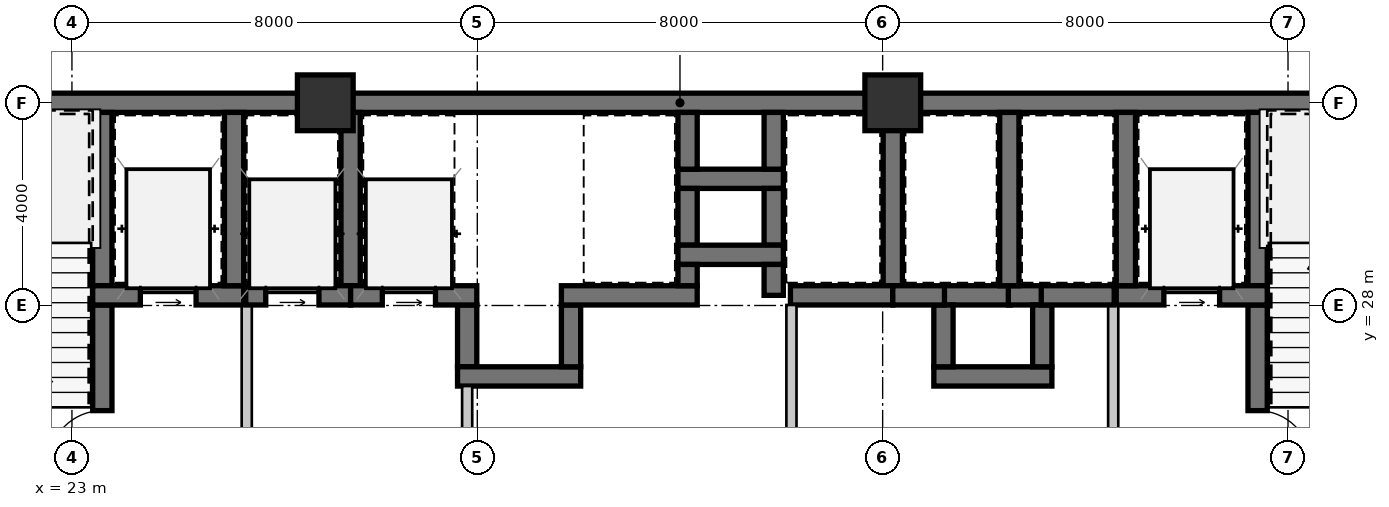
"""IFC4 building model, lengths in metres.
Left out: names, types, materials, properties, quantities, classifications, styles, units other than length and angle.
Written with IfcOpenShell. Run it as: python <this file> out.ifc"""

import sys

from ifc_helpers import new_model, si_unit, direction, frame, frame_2d, origin, origin_2d, place, context, subcontext, project, spatial, rectangle, extrude, source, transform, mapped, element, fill, save


model = new_model("IFC4")
c1 = context("Model", 3, precision=1e-05, world=origin(), true_north=direction((0.0, 1.0)))
c2 = subcontext(c1, "Body", "Model", "MODEL_VIEW")
j1 = project(units=[si_unit("LENGTHUNIT", "METRE"), si_unit("PLANEANGLEUNIT", "RADIAN")], contexts=[c1])
p1 = place(None, origin())
s1 = spatial("IfcSite", under=j1, at=p1, CompositionType="ELEMENT")
p2 = place(p1, origin())
s2 = spatial("IfcBuilding", under=s1, at=p2, CompositionType="ELEMENT")
p3 = place(p2, frame((0.0, 0.0, 4.55)))
s3 = spatial("IfcBuildingStorey", under=s2, at=p3, CompositionType="ELEMENT", Elevation=4.55)
m1 = source(origin(), c2, "Body", "SweptSolid", [
    extrude(rectangle(XDim=1.1, YDim=1.1, at=origin_2d()), origin(), (0.0, 0.0, 1.0), 3.85),
])
for number, where, z_axis, x_axis in (
    (1, (28.0, 32.0, 0.0), (0.0, 0.0, 1.0), (1.0, 0.0, 0.0)),
    (2, (39.2, 32.0, 0.0), (0.0, 0.0, 1.0), (1.0, 0.0, 0.0)),
):
    element("IfcColumn", number, at=place(p3, frame(where, z_axis=z_axis, x_axis=x_axis)), inside=s3, PredefinedType="COLUMN", context=c2, shape_type="MappedRepresentation", body=[
        mapped(m1, transform((0.0, 0.0, 0.0), scale=1.0)),
    ])
m2 = source(origin(), c2, "Body", "SweptSolid", [
    extrude(rectangle(XDim=9.19, YDim=0.38, at=frame_2d((4.595, 0.0))), origin(), (0.0, 0.0, 1.0), 3.59),
])
p4 = place(p3, frame((18.81, 32.0, 0.0), z_axis=(0.0, 0.0, 1.0), x_axis=(1.0, 0.0, 0.0)))
e3 = element("IfcWall", 3, at=p4, inside=s3, PredefinedType="SHEAR", context=c2, shape_type="MappedRepresentation", body=[
    mapped(m2, transform((0.0, 0.0, 0.0), scale=1.0)),
])
m3 = source(origin(), c2, "Body", "SweptSolid", [
    extrude(rectangle(XDim=11.2, YDim=0.38, at=frame_2d((5.6, 0.0))), origin(), (0.0, 0.0, 1.0), 3.59),
])
p5 = place(p3, frame((28.0, 32.0, 0.0), z_axis=(0.0, 0.0, 1.0), x_axis=(1.0, 0.0, 0.0)))
e4 = element("IfcWall", 4, at=p5, inside=s3, PredefinedType="SHEAR", context=c2, shape_type="MappedRepresentation", body=[
    mapped(m3, transform((0.0, 0.0, 0.0), scale=1.0)),
])
m4 = source(origin(), c2, "Body", "SweptSolid", [
    extrude(rectangle(XDim=11.99, YDim=0.38, at=frame_2d((5.995, 0.0))), origin(), (0.0, 0.0, 1.0), 3.59),
])
p6 = place(p3, frame((39.2, 32.0, 0.0), z_axis=(0.0, 0.0, 1.0), x_axis=(1.0, 0.0, 0.0)))
e5 = element("IfcWall", 5, at=p6, inside=s3, PredefinedType="SHEAR", context=c2, shape_type="MappedRepresentation", body=[
    mapped(m4, transform((0.0, 0.0, 0.0), scale=1.0)),
])
m5 = source(origin(), c2, "Body", "SweptSolid", [
    extrude(rectangle(XDim=3.42, YDim=0.38, at=frame_2d((1.71, 0.0))), origin(), (0.0, 0.0, 1.0), 3.59),
])
p7 = place(p3, frame((23.6, 28.39, 0.0), z_axis=(0.0, 0.0, 1.0), x_axis=(0.0, 1.0, 0.0)))
e6 = element("IfcWall", 6, at=p7, inside=s3, PredefinedType="SHEAR", context=c2, shape_type="MappedRepresentation", body=[
    mapped(m5, transform((0.0, 0.0, 0.0), scale=1.0)),
])
m6 = source(origin(), c2, "Body", "SweptSolid", [
    extrude(rectangle(XDim=3.82, YDim=0.38, at=frame_2d((1.91, 0.0))), origin(), (0.0, 0.0, 1.0), 3.59),
])
p8 = place(p3, frame((23.6, 24.19, 0.0), z_axis=(0.0, 0.0, 1.0), x_axis=(0.0, 1.0, 0.0)))
e7 = element("IfcWall", 7, at=p8, inside=s3, PredefinedType="SHEAR", context=c2, shape_type="MappedRepresentation", body=[
    mapped(m6, transform((0.0, 0.0, 0.0), scale=1.0)),
])
m7 = source(origin(), c2, "Body", "SweptSolid", [
    extrude(rectangle(XDim=1.05, YDim=2.1, at=frame_2d((0.525, 1.05))), frame((0.0, 0.2, 0.0), z_axis=(0.0, -1.0, 0.0), x_axis=(1.0, 0.0, 0.0)), (0.0, 0.0, 1.0), 0.4),
])
p9 = place(p8, frame((0.685, 0.0, 0.0)))
e8 = element("IfcOpeningElement", 8, at=p9, cuts=e7, PredefinedType="OPENING", context=c2, shape_type="MappedRepresentation", body=[
    mapped(m7, transform((0.0, 0.0, 0.0), scale=1.0)),
])
m8 = source(origin(), c2, "Body", "SweptSolid", [
    extrude(rectangle(XDim=2.98, YDim=0.38, at=frame_2d((1.49, 0.0))), origin(), (0.0, 0.0, 1.0), 3.59),
])
p10 = place(p3, frame((23.41, 28.2, 0.0), z_axis=(0.0, 0.0, 1.0), x_axis=(1.0, 0.0, 0.0)))
e9 = element("IfcWall", 9, at=p10, inside=s3, PredefinedType="SHEAR", context=c2, shape_type="MappedRepresentation", body=[
    mapped(m8, transform((0.0, 0.0, 0.0), scale=1.0)),
])
m9 = source(origin(), c2, "Body", "SweptSolid", [
    extrude(rectangle(XDim=1.1, YDim=2.15, at=frame_2d((0.55, 1.075))), frame((0.0, 0.2, 0.0), z_axis=(0.0, -1.0, 0.0), x_axis=(1.0, 0.0, 0.0)), (0.0, 0.0, 1.0), 0.4),
])
p11 = place(p10, frame((0.94, 0.0, 0.0)))
e10 = element("IfcOpeningElement", 10, at=p11, cuts=e9, PredefinedType="OPENING", context=c2, shape_type="MappedRepresentation", body=[
    mapped(m9, transform((0.0, 0.0, 0.0), scale=1.0)),
])
p12 = place(p3, frame((26.2, 28.39, 0.0), z_axis=(0.0, 0.0, 1.0), x_axis=(0.0, 1.0, 0.0)))
e11 = element("IfcWall", 11, at=p12, inside=s3, PredefinedType="SHEAR", context=c2, shape_type="MappedRepresentation", body=[
    mapped(m5, transform((0.0, 0.0, 0.0), scale=1.0)),
])
m10 = source(origin(), c2, "Body", "SweptSolid", [
    extrude(rectangle(XDim=3.91, YDim=0.2, at=frame_2d((1.955, 0.0))), origin(), (0.0, 0.0, 1.0), 3.59),
])
p13 = place(p3, frame((26.45, 24.1, 0.0), z_axis=(0.0, 0.0, 1.0), x_axis=(0.0, 1.0, 0.0)))
e12 = element("IfcWall", 12, at=p13, inside=s3, PredefinedType="SOLIDWALL", context=c2, shape_type="MappedRepresentation", body=[
    mapped(m10, transform((0.0, 0.0, 0.0), scale=1.0)),
])
p14 = place(p3, frame((46.4, 31.81, 0.0), z_axis=(0.0, 0.0, 1.0), x_axis=(0.0, -1.0, 0.0)))
e13 = element("IfcWall", 13, at=p14, inside=s3, PredefinedType="SHEAR", context=c2, shape_type="MappedRepresentation", body=[
    mapped(m5, transform((0.0, 0.0, 0.0), scale=1.0)),
])
p15 = place(p3, frame((46.4, 28.01, 0.0), z_axis=(0.0, 0.0, 1.0), x_axis=(0.0, -1.0, 0.0)))
e14 = element("IfcWall", 14, at=p15, inside=s3, PredefinedType="SHEAR", context=c2, shape_type="MappedRepresentation", body=[
    mapped(m6, transform((0.0, 0.0, 0.0), scale=1.0)),
])
p16 = place(p15, frame((2.085, 0.0, 0.0)))
e15 = element("IfcOpeningElement", 15, at=p16, cuts=e14, PredefinedType="OPENING", context=c2, shape_type="MappedRepresentation", body=[
    mapped(m7, transform((0.0, 0.0, 0.0), scale=1.0)),
])
p17 = place(p3, frame((43.61, 28.2, 0.0), z_axis=(0.0, 0.0, 1.0), x_axis=(1.0, 0.0, 0.0)))
e16 = element("IfcWall", 16, at=p17, inside=s3, PredefinedType="SHEAR", context=c2, shape_type="MappedRepresentation", body=[
    mapped(m8, transform((0.0, 0.0, 0.0), scale=1.0)),
])
p18 = place(p17, frame((0.94, 0.0, 0.0)))
e17 = element("IfcOpeningElement", 17, at=p18, cuts=e16, PredefinedType="OPENING", context=c2, shape_type="MappedRepresentation", body=[
    mapped(m9, transform((0.0, 0.0, 0.0), scale=1.0)),
])
p19 = place(p3, frame((43.8, 31.81, 0.0), z_axis=(0.0, 0.0, 1.0), x_axis=(0.0, -1.0, 0.0)))
e18 = element("IfcWall", 18, at=p19, inside=s3, PredefinedType="SHEAR", context=c2, shape_type="MappedRepresentation", body=[
    mapped(m5, transform((0.0, 0.0, 0.0), scale=1.0)),
])
p20 = place(p3, frame((43.55, 28.01, 0.0), z_axis=(0.0, 0.0, 1.0), x_axis=(0.0, -1.0, 0.0)))
e19 = element("IfcWall", 19, at=p20, inside=s3, PredefinedType="SOLIDWALL", context=c2, shape_type="MappedRepresentation", body=[
    mapped(m10, transform((0.0, 0.0, 0.0), scale=1.0)),
])
m11 = source(origin(), c2, "Body", "SweptSolid", [
    extrude(rectangle(XDim=2.08, YDim=0.38, at=frame_2d((1.04, 0.0))), origin(), (0.0, 0.0, 1.0), 3.59),
])
p21 = place(p3, frame((34.96, 30.5, 0.0), z_axis=(0.0, 0.0, 1.0), x_axis=(1.0, 0.0, 0.0)))
e20 = element("IfcWall", 20, at=p21, inside=s3, PredefinedType="SHEAR", context=c2, shape_type="MappedRepresentation", body=[
    mapped(m11, transform((0.0, 0.0, 0.0), scale=1.0)),
])
m12 = source(origin(), c2, "Body", "SweptSolid", [
    extrude(rectangle(XDim=1.12, YDim=0.38, at=frame_2d((0.56, 0.0))), origin(), (0.0, 0.0, 1.0), 3.59),
])
for number, where, z_axis, x_axis in (
    (21, (35.15, 31.81, 0.0), (0.0, 0.0, 1.0), (0.0, -1.0, 0.0)),
    (22, (36.85, 30.69, 0.0), (0.0, 0.0, 1.0), (0.0, 1.0, 0.0)),
    (23, (35.15, 30.31, 0.0), (0.0, 0.0, 1.0), (0.0, -1.0, 0.0)),
    (24, (36.85, 29.19, 0.0), (0.0, 0.0, 1.0), (0.0, 1.0, 0.0)),
):
    element("IfcWall", number, at=place(p3, frame(where, z_axis=z_axis, x_axis=x_axis)), inside=s3, PredefinedType="SHEAR", context=c2, shape_type="MappedRepresentation", body=[
        mapped(m12, transform((0.0, 0.0, 0.0), scale=1.0)),
    ])
p22 = place(p3, frame((34.96, 29.0, 0.0), z_axis=(0.0, 0.0, 1.0), x_axis=(1.0, 0.0, 0.0)))
e25 = element("IfcWall", 25, at=p22, inside=s3, PredefinedType="SHEAR", context=c2, shape_type="MappedRepresentation", body=[
    mapped(m11, transform((0.0, 0.0, 0.0), scale=1.0)),
])
m13 = source(origin(), c2, "Body", "SweptSolid", [
    extrude(rectangle(XDim=1.22, YDim=0.38, at=frame_2d((0.61, 0.0))), origin(), (0.0, 0.0, 1.0), 3.59),
])
p23 = place(p3, frame((30.8, 28.01, 0.0), z_axis=(0.0, 0.0, 1.0), x_axis=(0.0, -1.0, 0.0)))
e26 = element("IfcWall", 26, at=p23, inside=s3, PredefinedType="SHEAR", context=c2, shape_type="MappedRepresentation", body=[
    mapped(m13, transform((0.0, 0.0, 0.0), scale=1.0)),
])
m14 = source(origin(), c2, "Body", "SweptSolid", [
    extrude(rectangle(XDim=2.43, YDim=0.38, at=frame_2d((1.215, 0.0))), origin(), (0.0, 0.0, 1.0), 3.59),
])
p24 = place(p3, frame((30.61, 26.6, 0.0), z_axis=(0.0, 0.0, 1.0), x_axis=(1.0, 0.0, 0.0)))
e27 = element("IfcWall", 27, at=p24, inside=s3, PredefinedType="SHEAR", context=c2, shape_type="MappedRepresentation", body=[
    mapped(m14, transform((0.0, 0.0, 0.0), scale=1.0)),
])
p25 = place(p3, frame((32.85, 26.79, 0.0), z_axis=(0.0, 0.0, 1.0), x_axis=(0.0, 1.0, 0.0)))
e28 = element("IfcWall", 28, at=p25, inside=s3, PredefinedType="SHEAR", context=c2, shape_type="MappedRepresentation", body=[
    mapped(m13, transform((0.0, 0.0, 0.0), scale=1.0)),
])
m15 = source(origin(), c2, "Body", "SweptSolid", [
    extrude(rectangle(XDim=1.32, YDim=0.38, at=frame_2d((0.66, 0.0))), origin(), (0.0, 0.0, 1.0), 3.59),
])
p26 = place(p3, frame((41.52, 28.2, 0.0), z_axis=(0.0, 0.0, 1.0), x_axis=(-1.0, 0.0, 0.0)))
e29 = element("IfcWall", 29, at=p26, inside=s3, PredefinedType="SHEAR", context=c2, shape_type="MappedRepresentation", body=[
    mapped(m15, transform((0.0, 0.0, 0.0), scale=1.0)),
])
m16 = source(origin(), c2, "Body", "SweptSolid", [
    extrude(rectangle(XDim=0.67, YDim=0.38, at=frame_2d((0.335, 0.0))), origin(), (0.0, 0.0, 1.0), 3.59),
])
p27 = place(p3, frame((42.15, 28.2, 0.0), z_axis=(0.0, 0.0, 1.0), x_axis=(-1.0, 0.0, 0.0)))
e30 = element("IfcWall", 30, at=p27, inside=s3, PredefinedType="SHEAR", context=c2, shape_type="MappedRepresentation", body=[
    mapped(m16, transform((0.0, 0.0, 0.0), scale=1.0)),
])
m17 = source(origin(), c2, "Body", "SweptSolid", [
    extrude(rectangle(XDim=2.33, YDim=0.38, at=frame_2d((1.165, 0.0))), origin(), (0.0, 0.0, 1.0), 3.59),
])
p28 = place(p3, frame((40.01, 26.6, 0.0), z_axis=(0.0, 0.0, 1.0), x_axis=(1.0, 0.0, 0.0)))
e31 = element("IfcWall", 31, at=p28, inside=s3, PredefinedType="SHEAR", context=c2, shape_type="MappedRepresentation", body=[
    mapped(m17, transform((0.0, 0.0, 0.0), scale=1.0)),
])
for number, where, z_axis, x_axis in (
    (32, (40.2, 28.01, 0.0), (0.0, 0.0, 1.0), (0.0, -1.0, 0.0)),
    (33, (42.15, 26.79, 0.0), (0.0, 0.0, 1.0), (0.0, 1.0, 0.0)),
):
    element("IfcWall", number, at=place(p3, frame(where, z_axis=z_axis, x_axis=x_axis)), inside=s3, PredefinedType="SHEAR", context=c2, shape_type="MappedRepresentation", body=[
        mapped(m13, transform((0.0, 0.0, 0.0), scale=1.0)),
    ])
p29 = place(p3, frame((28.5, 28.39, 0.0), z_axis=(0.0, 0.0, 1.0), x_axis=(0.0, 1.0, 0.0)))
e34 = element("IfcWall", 34, at=p29, inside=s3, PredefinedType="SHEAR", context=c2, shape_type="MappedRepresentation", body=[
    mapped(m5, transform((0.0, 0.0, 0.0), scale=1.0)),
])
m18 = source(origin(), c2, "Body", "SweptSolid", [
    extrude(rectangle(XDim=2.07, YDim=0.38, at=frame_2d((1.035, 0.0))), origin(), (0.0, 0.0, 1.0), 3.59),
])
p30 = place(p3, frame((26.43, 28.2, 0.0), z_axis=(0.0, 0.0, 1.0), x_axis=(1.0, 0.0, 0.0)))
e35 = element("IfcWall", 35, at=p30, inside=s3, PredefinedType="SHEAR", context=c2, shape_type="MappedRepresentation", body=[
    mapped(m18, transform((0.0, 0.0, 0.0), scale=1.0)),
])
m19 = source(origin(), c2, "Body", "SweptSolid", [
    extrude(rectangle(XDim=1.05, YDim=2.15, at=frame_2d((0.525, 1.075))), frame((0.0, 0.2, 0.0), z_axis=(0.0, -1.0, 0.0), x_axis=(1.0, 0.0, 0.0)), (0.0, 0.0, 1.0), 0.4),
])
p31 = place(p30, frame((0.395, 0.0, 0.0)))
e36 = element("IfcOpeningElement", 36, at=p31, cuts=e35, PredefinedType="OPENING", context=c2, shape_type="MappedRepresentation", body=[
    mapped(m19, transform((0.0, 0.0, 0.0), scale=1.0)),
])
m20 = source(origin(), c2, "Body", "SweptSolid", [
    extrude(rectangle(XDim=2.49, YDim=0.38, at=frame_2d((1.245, 0.0))), origin(), (0.0, 0.0, 1.0), 3.59),
])
p32 = place(p3, frame((28.5, 28.2, 0.0), z_axis=(0.0, 0.0, 1.0), x_axis=(1.0, 0.0, 0.0)))
e37 = element("IfcWall", 37, at=p32, inside=s3, PredefinedType="SHEAR", context=c2, shape_type="MappedRepresentation", body=[
    mapped(m20, transform((0.0, 0.0, 0.0), scale=1.0)),
])
p33 = place(p32, frame((0.625, 0.0, 0.0)))
e38 = element("IfcOpeningElement", 38, at=p33, cuts=e37, PredefinedType="OPENING", context=c2, shape_type="MappedRepresentation", body=[
    mapped(m19, transform((0.0, 0.0, 0.0), scale=1.0)),
])
m21 = source(origin(), c2, "Body", "SweptSolid", [
    extrude(rectangle(XDim=2.31, YDim=0.2, at=frame_2d((1.155, 0.0))), origin(), (0.0, 0.0, 1.0), 3.59),
])
p34 = place(p3, frame((30.8, 26.41, 0.0), z_axis=(0.0, 0.0, 1.0), x_axis=(0.0, -1.0, 0.0)))
e39 = element("IfcWall", 39, at=p34, inside=s3, PredefinedType="SOLIDWALL", context=c2, shape_type="MappedRepresentation", body=[
    mapped(m21, transform((0.0, 0.0, 0.0), scale=1.0)),
])
m22 = source(origin(), c2, "Body", "SweptSolid", [
    extrude(rectangle(XDim=2.68, YDim=0.38, at=frame_2d((1.34, 0.0))), origin(), (0.0, 0.0, 1.0), 3.59),
])
p35 = place(p3, frame((32.66, 28.2, 0.0), z_axis=(0.0, 0.0, 1.0), x_axis=(1.0, 0.0, 0.0)))
e40 = element("IfcWall", 40, at=p35, inside=s3, PredefinedType="SHEAR", context=c2, shape_type="MappedRepresentation", body=[
    mapped(m22, transform((0.0, 0.0, 0.0), scale=1.0)),
])
m23 = source(origin(), c2, "Body", "SweptSolid", [
    extrude(rectangle(XDim=0.42, YDim=0.38, at=frame_2d((0.21, 0.0))), origin(), (0.0, 0.0, 1.0), 3.59),
])
p36 = place(p3, frame((35.15, 28.39, 0.0), z_axis=(0.0, 0.0, 1.0), x_axis=(0.0, 1.0, 0.0)))
e41 = element("IfcWall", 41, at=p36, inside=s3, PredefinedType="SHEAR", context=c2, shape_type="MappedRepresentation", body=[
    mapped(m23, transform((0.0, 0.0, 0.0), scale=1.0)),
])
p37 = place(p3, frame((39.2, 28.39, 0.0), z_axis=(0.0, 0.0, 1.0), x_axis=(0.0, 1.0, 0.0)))
e42 = element("IfcWall", 42, at=p37, inside=s3, PredefinedType="SHEAR", context=c2, shape_type="MappedRepresentation", body=[
    mapped(m5, transform((0.0, 0.0, 0.0), scale=1.0)),
])
m24 = source(origin(), c2, "Body", "SweptSolid", [
    extrude(rectangle(XDim=0.61, YDim=0.38, at=frame_2d((0.305, 0.0))), origin(), (0.0, 0.0, 1.0), 3.59),
])
p38 = place(p3, frame((36.85, 28.81, 0.0), z_axis=(0.0, 0.0, 1.0), x_axis=(0.0, -1.0, 0.0)))
e43 = element("IfcWall", 43, at=p38, inside=s3, PredefinedType="SHEAR", context=c2, shape_type="MappedRepresentation", body=[
    mapped(m24, transform((0.0, 0.0, 0.0), scale=1.0)),
])
m25 = source(origin(), c2, "Body", "SweptSolid", [
    extrude(rectangle(XDim=2.02, YDim=0.38, at=frame_2d((1.01, 0.0))), origin(), (0.0, 0.0, 1.0), 3.59),
])
p39 = place(p3, frame((37.18, 28.2, 0.0), z_axis=(0.0, 0.0, 1.0), x_axis=(1.0, 0.0, 0.0)))
e44 = element("IfcWall", 44, at=p39, inside=s3, PredefinedType="SHEAR", context=c2, shape_type="MappedRepresentation", body=[
    mapped(m25, transform((0.0, 0.0, 0.0), scale=1.0)),
])
p40 = place(p3, frame((41.5, 28.39, 0.0), z_axis=(0.0, 0.0, 1.0), x_axis=(0.0, 1.0, 0.0)))
e45 = element("IfcWall", 45, at=p40, inside=s3, PredefinedType="SHEAR", context=c2, shape_type="MappedRepresentation", body=[
    mapped(m5, transform((0.0, 0.0, 0.0), scale=1.0)),
])
m26 = source(origin(), c2, "Body", "SweptSolid", [
    extrude(rectangle(XDim=1.02, YDim=0.38, at=frame_2d((0.51, 0.0))), origin(), (0.0, 0.0, 1.0), 3.59),
])
p41 = place(p3, frame((39.2, 28.2, 0.0), z_axis=(0.0, 0.0, 1.0), x_axis=(1.0, 0.0, 0.0)))
e46 = element("IfcWall", 46, at=p41, inside=s3, PredefinedType="SHEAR", context=c2, shape_type="MappedRepresentation", body=[
    mapped(m26, transform((0.0, 0.0, 0.0), scale=1.0)),
])
m27 = source(origin(), c2, "Body", "SweptSolid", [
    extrude(rectangle(XDim=1.44, YDim=0.38, at=frame_2d((0.72, 0.0))), origin(), (0.0, 0.0, 1.0), 3.59),
])
p42 = place(p3, frame((42.13, 28.2, 0.0), z_axis=(0.0, 0.0, 1.0), x_axis=(1.0, 0.0, 0.0)))
e47 = element("IfcWall", 47, at=p42, inside=s3, PredefinedType="SHEAR", context=c2, shape_type="MappedRepresentation", body=[
    mapped(m27, transform((0.0, 0.0, 0.0), scale=1.0)),
])
p43 = place(p3, frame((37.2, 28.01, 0.0), z_axis=(0.0, 0.0, 1.0), x_axis=(0.0, -1.0, 0.0)))
e48 = element("IfcWall", 48, at=p43, inside=s3, PredefinedType="SOLIDWALL", context=c2, shape_type="MappedRepresentation", body=[
    mapped(m10, transform((0.0, 0.0, 0.0), scale=1.0)),
])
m28 = source(origin(), c2, "Body", "SweptSolid", [
    extrude(rectangle(XDim=1.05, YDim=2.1, at=frame_2d((0.525, 1.05))), frame((0.0, 0.025, 0.0), z_axis=(0.0, -1.0, 0.0), x_axis=(1.0, 0.0, 0.0)), (0.0, 0.0, 1.0), 0.05),
])
p44 = place(p9, origin())
e49 = element("IfcDoor", 49, at=p44, inside=s3, OperationType="SINGLE_SWING_LEFT", PredefinedType="DOOR", context=c2, shape_type="MappedRepresentation", body=[
    mapped(m28, transform((0.0, 0.0, 0.0), scale=1.0)),
])
fill(e8, e49)
m29 = source(origin(), c2, "Body", "SweptSolid", [
    extrude(rectangle(XDim=1.1, YDim=2.15, at=frame_2d((0.55, 1.075))), frame((0.0, 0.025, 0.0), z_axis=(0.0, -1.0, 0.0), x_axis=(1.0, 0.0, 0.0)), (0.0, 0.0, 1.0), 0.05),
])
p45 = place(p11, origin())
e50 = element("IfcDoor", 50, at=p45, inside=s3, OperationType="SLIDING_TO_LEFT", PredefinedType="DOOR", context=c2, shape_type="MappedRepresentation", body=[
    mapped(m29, transform((0.0, 0.0, 0.0), scale=1.0)),
])
fill(e10, e50)
p46 = place(p16, origin())
e51 = element("IfcDoor", 51, at=p46, inside=s3, OperationType="SINGLE_SWING_RIGHT", PredefinedType="DOOR", context=c2, shape_type="MappedRepresentation", body=[
    mapped(m28, transform((0.0, 0.0, 0.0), scale=1.0)),
])
fill(e15, e51)
p47 = place(p18, origin())
e52 = element("IfcDoor", 52, at=p47, inside=s3, OperationType="SLIDING_TO_LEFT", PredefinedType="DOOR", context=c2, shape_type="MappedRepresentation", body=[
    mapped(m29, transform((0.0, 0.0, 0.0), scale=1.0)),
])
fill(e17, e52)
m30 = source(origin(), c2, "Body", "SweptSolid", [
    extrude(rectangle(XDim=1.05, YDim=2.15, at=frame_2d((0.525, 1.075))), frame((0.0, 0.025, 0.0), z_axis=(0.0, -1.0, 0.0), x_axis=(1.0, 0.0, 0.0)), (0.0, 0.0, 1.0), 0.05),
])
p48 = place(p31, origin())
e53 = element("IfcDoor", 53, at=p48, inside=s3, OperationType="SLIDING_TO_LEFT", PredefinedType="DOOR", context=c2, shape_type="MappedRepresentation", body=[
    mapped(m30, transform((0.0, 0.0, 0.0), scale=1.0)),
])
fill(e36, e53)
p49 = place(p33, origin())
e54 = element("IfcDoor", 54, at=p49, inside=s3, OperationType="SLIDING_TO_LEFT", PredefinedType="DOOR", context=c2, shape_type="MappedRepresentation", body=[
    mapped(m30, transform((0.0, 0.0, 0.0), scale=1.0)),
])
fill(e38, e54)
save(model, sys.argv[1])
